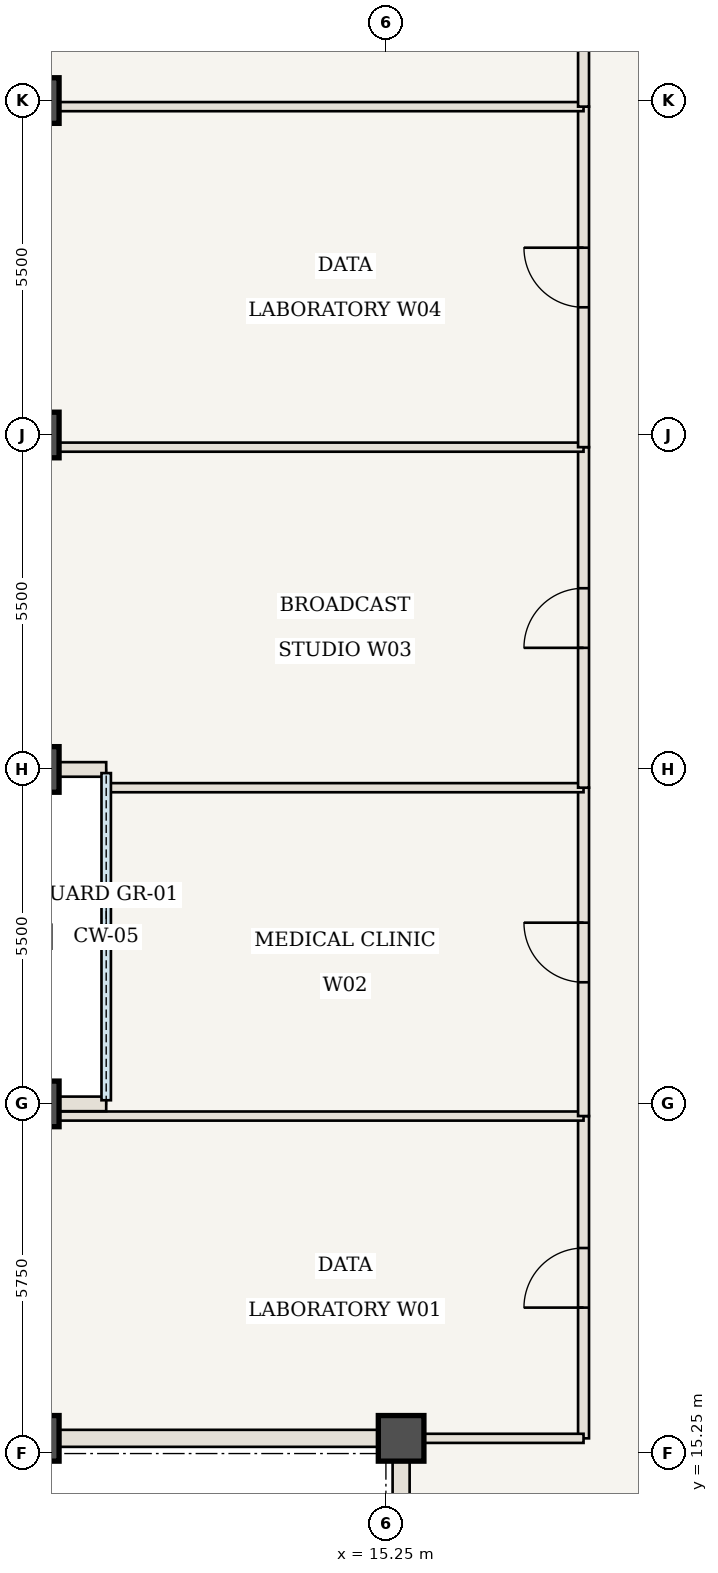
"""IFC4 building model, lengths in metres.
Left out: names, types, materials, properties, quantities, classifications, styles, units other than length and angle.
Written with IfcOpenShell. Run it as: python <this file> out.ifc"""

import sys

from ifc_helpers import new_model, si_unit, direction, frame, frame_2d, origin, origin_2d, place, context, subcontext, project, spatial, rectangle, extrude, element, fill, save


model = new_model("IFC4")
c1 = context("Model", 3, precision=1e-05, world=origin(), true_north=direction((0.0, 1.0)))
c2 = subcontext(c1, "Body", "Model", "MODEL_VIEW")
j1 = project(units=[si_unit("LENGTHUNIT", "METRE"), si_unit("PLANEANGLEUNIT", "RADIAN")], contexts=[c1])
p1 = place(None, origin())
s1 = spatial("IfcSite", under=j1, at=p1, CompositionType="ELEMENT")
p2 = place(p1, origin())
s2 = spatial("IfcBuilding", under=s1, at=p2, CompositionType="ELEMENT")
p3 = place(p2, frame((0.0, 0.0, 304.5)))
s3 = spatial("IfcBuildingStorey", under=s2, at=p3, CompositionType="ELEMENT", Elevation=304.5)
for number, where, z_axis, x_axis in (
    (1, (15.5, 15.5, 0.0), (0.0, 0.0, 1.0), (1.0, 0.0, 0.0)),
    (2, (9.5, 15.5, 0.0), (0.0, 0.0, 1.0), (1.0, 0.0, 0.0)),
    (3, (9.5, 21.0, 0.0), (0.0, 0.0, 1.0), (1.0, 0.0, 0.0)),
    (4, (9.5, 26.5, 0.0), (0.0, 0.0, 1.0), (1.0, 0.0, 0.0)),
    (5, (9.5, 32.0, 0.0), (0.0, 0.0, 1.0), (1.0, 0.0, 0.0)),
    (6, (9.5, 37.5, 0.0), (0.0, 0.0, 1.0), (1.0, 0.0, 0.0)),
):
    element("IfcColumn", number, at=place(p3, frame(where, z_axis=z_axis, x_axis=x_axis)), inside=s3, PredefinedType="COLUMN", context=c2, shape_type="SweptSolid", body=[
        extrude(rectangle(XDim=0.75, YDim=0.75, at=origin_2d()), origin(), (0.0, 0.0, 1.0), 3.85),
    ])
p4 = place(p3, frame((18.5, 15.5, 0.0), z_axis=(0.0, 0.0, 1.0), x_axis=(0.0, 1.0, 0.0)))
e7 = element("IfcWall", 7, at=p4, inside=s3, PredefinedType="STANDARD", context=c2, shape_type="SweptSolid", body=[
    extrude(rectangle(XDim=5.3, YDim=0.18, at=frame_2d((2.65, 0.0))), origin(), (0.0, 0.0, 1.0), 3.63),
])
p5 = place(p4, frame((2.15, 0.0, 0.0)))
e8 = element("IfcOpeningElement", 8, at=p5, cuts=e7, PredefinedType="OPENING", context=c2, shape_type="SweptSolid", body=[
    extrude(rectangle(XDim=0.98, YDim=2.2, at=frame_2d((0.49, 1.1))), frame((0.0, 0.1, 0.0), z_axis=(0.0, -1.0, 0.0), x_axis=(1.0, 0.0, 0.0)), (0.0, 0.0, 1.0), 0.2),
])
p6 = place(p3, frame((9.56, 20.8, 0.0), z_axis=(0.0, 0.0, 1.0), x_axis=(1.0, 0.0, 0.0)))
e9 = element("IfcWall", 9, at=p6, inside=s3, PredefinedType="STANDARD", context=c2, shape_type="SweptSolid", body=[
    extrude(rectangle(XDim=8.94, YDim=0.15, at=frame_2d((4.47, 0.0))), origin(), (0.0, 0.0, 1.0), 3.085),
])
p7 = place(p3, frame((18.5, 20.8, 0.0), z_axis=(0.0, 0.0, 1.0), x_axis=(0.0, 1.0, 0.0)))
e10 = element("IfcWall", 10, at=p7, inside=s3, PredefinedType="STANDARD", context=c2, shape_type="SweptSolid", body=[
    extrude(rectangle(XDim=5.4, YDim=0.18, at=frame_2d((2.7, 0.0))), origin(), (0.0, 0.0, 1.0), 3.63),
])
p8 = place(p7, frame((2.2, 0.0, 0.0)))
e11 = element("IfcOpeningElement", 11, at=p8, cuts=e10, PredefinedType="OPENING", context=c2, shape_type="SweptSolid", body=[
    extrude(rectangle(XDim=0.98, YDim=2.2, at=frame_2d((0.49, 1.1))), frame((0.0, 0.1, 0.0), z_axis=(0.0, -1.0, 0.0), x_axis=(1.0, 0.0, 0.0)), (0.0, 0.0, 1.0), 0.2),
])
p9 = place(p3, frame((10.66, 26.2, 0.0), z_axis=(0.0, 0.0, 1.0), x_axis=(1.0, 0.0, 0.0)))
e12 = element("IfcWall", 12, at=p9, inside=s3, PredefinedType="STANDARD", context=c2, shape_type="SweptSolid", body=[
    extrude(rectangle(XDim=7.84, YDim=0.15, at=frame_2d((3.92, 0.0))), origin(), (0.0, 0.0, 1.0), 3.63),
])
p10 = place(p3, frame((18.5, 26.2, 0.0), z_axis=(0.0, 0.0, 1.0), x_axis=(0.0, 1.0, 0.0)))
e13 = element("IfcWall", 13, at=p10, inside=s3, PredefinedType="STANDARD", context=c2, shape_type="SweptSolid", body=[
    extrude(rectangle(XDim=5.6, YDim=0.18, at=frame_2d((2.8, 0.0))), origin(), (0.0, 0.0, 1.0), 3.63),
])
p11 = place(p10, frame((2.3, 0.0, 0.0)))
e14 = element("IfcOpeningElement", 14, at=p11, cuts=e13, PredefinedType="OPENING", context=c2, shape_type="SweptSolid", body=[
    extrude(rectangle(XDim=0.98, YDim=2.2, at=frame_2d((0.49, 1.1))), frame((0.0, 0.1, 0.0), z_axis=(0.0, -1.0, 0.0), x_axis=(1.0, 0.0, 0.0)), (0.0, 0.0, 1.0), 0.2),
])
p12 = place(p3, frame((9.56, 31.8, 0.0), z_axis=(0.0, 0.0, 1.0), x_axis=(1.0, 0.0, 0.0)))
e15 = element("IfcWall", 15, at=p12, inside=s3, PredefinedType="STANDARD", context=c2, shape_type="SweptSolid", body=[
    extrude(rectangle(XDim=8.94, YDim=0.15, at=frame_2d((4.47, 0.0))), origin(), (0.0, 0.0, 1.0), 3.085),
])
p13 = place(p3, frame((18.5, 31.8, 0.0), z_axis=(0.0, 0.0, 1.0), x_axis=(0.0, 1.0, 0.0)))
e16 = element("IfcWall", 16, at=p13, inside=s3, PredefinedType="STANDARD", context=c2, shape_type="SweptSolid", body=[
    extrude(rectangle(XDim=5.6, YDim=0.18, at=frame_2d((2.8, 0.0))), origin(), (0.0, 0.0, 1.0), 3.63),
])
p14 = place(p13, frame((2.3, 0.0, 0.0)))
e17 = element("IfcOpeningElement", 17, at=p14, cuts=e16, PredefinedType="OPENING", context=c2, shape_type="SweptSolid", body=[
    extrude(rectangle(XDim=0.98, YDim=2.2, at=frame_2d((0.49, 1.1))), frame((0.0, 0.1, 0.0), z_axis=(0.0, -1.0, 0.0), x_axis=(1.0, 0.0, 0.0)), (0.0, 0.0, 1.0), 0.2),
])
p15 = place(p3, frame((9.56, 37.4, 0.0), z_axis=(0.0, 0.0, 1.0), x_axis=(1.0, 0.0, 0.0)))
e18 = element("IfcWall", 18, at=p15, inside=s3, PredefinedType="STANDARD", context=c2, shape_type="SweptSolid", body=[
    extrude(rectangle(XDim=8.94, YDim=0.15, at=frame_2d((4.47, 0.0))), origin(), (0.0, 0.0, 1.0), 3.63),
])
p16 = place(p3, frame((18.5, 37.4, 0.0), z_axis=(0.0, 0.0, 1.0), x_axis=(0.0, 1.0, 0.0)))
e19 = element("IfcWall", 19, at=p16, inside=s3, PredefinedType="STANDARD", context=c2, shape_type="SweptSolid", body=[
    extrude(rectangle(XDim=5.6, YDim=0.18, at=frame_2d((2.8, 0.0))), origin(), (0.0, 0.0, 1.0), 3.63),
])
p17 = place(p16, frame((2.3, 0.0, 0.0)))
e20 = element("IfcOpeningElement", 20, at=p17, cuts=e19, PredefinedType="OPENING", context=c2, shape_type="SweptSolid", body=[
    extrude(rectangle(XDim=0.98, YDim=2.2, at=frame_2d((0.49, 1.1))), frame((0.0, 0.1, 0.0), z_axis=(0.0, -1.0, 0.0), x_axis=(1.0, 0.0, 0.0)), (0.0, 0.0, 1.0), 0.2),
])
p18 = place(p3, frame((15.5, 15.5, 0.0), z_axis=(0.0, 0.0, 1.0), x_axis=(1.0, 0.0, 0.0)))
e21 = element("IfcWall", 21, at=p18, inside=s3, PredefinedType="STANDARD", context=c2, shape_type="SweptSolid", body=[
    extrude(rectangle(XDim=3.0, YDim=0.15, at=frame_2d((1.5, 0.0))), origin(), (0.0, 0.0, 1.0), 3.63),
])
for number, where, z_axis, x_axis in (
    (22, (9.5, 21.0, 0.0), (0.0, 0.0, 1.0), (1.0, 0.0, 0.0)),
    (23, (9.5, 26.5, 0.0), (0.0, 0.0, 1.0), (1.0, 0.0, 0.0)),
):
    element("IfcWall", number, at=place(p3, frame(where, z_axis=z_axis, x_axis=x_axis)), inside=s3, PredefinedType="USERDEFINED", context=c2, shape_type="SweptSolid", body=[
        extrude(rectangle(XDim=1.15, YDim=0.24, at=frame_2d((0.575, 0.0))), origin(), (0.0, 0.0, 1.0), 2.93),
    ])
for number, where, z_axis, x_axis in (
    (24, (15.5, 9.5, 0.0), (0.0, 0.0, 1.0), (0.0, 1.0, 0.0)),
    (25, (15.5, 15.5, 0.0), (0.0, 0.0, 1.0), (-1.0, 0.0, 0.0)),
):
    element("IfcWall", number, at=place(p3, frame(where, z_axis=z_axis, x_axis=x_axis)), inside=s3, PredefinedType="USERDEFINED", context=c2, shape_type="SweptSolid", body=[
        extrude(rectangle(XDim=6.0, YDim=0.28, at=frame_2d((3.0, 0.0))), origin(), (0.0, 0.0, 1.0), 2.93),
    ])
p19 = place(p5, origin())
e26 = element("IfcDoor", 26, at=p19, inside=s3, OperationType="SINGLE_SWING_LEFT", PredefinedType="DOOR", context=c2, shape_type="SweptSolid", body=[
    extrude(rectangle(XDim=0.98, YDim=2.2, at=frame_2d((0.49, 1.1))), frame((0.0, 0.025, 0.0), z_axis=(0.0, -1.0, 0.0), x_axis=(1.0, 0.0, 0.0)), (0.0, 0.0, 1.0), 0.05),
])
fill(e8, e26)
p20 = place(p8, origin())
e27 = element("IfcDoor", 27, at=p20, inside=s3, OperationType="SINGLE_SWING_RIGHT", PredefinedType="DOOR", context=c2, shape_type="SweptSolid", body=[
    extrude(rectangle(XDim=0.98, YDim=2.2, at=frame_2d((0.49, 1.1))), frame((0.0, 0.025, 0.0), z_axis=(0.0, -1.0, 0.0), x_axis=(1.0, 0.0, 0.0)), (0.0, 0.0, 1.0), 0.05),
])
fill(e11, e27)
p21 = place(p11, origin())
e28 = element("IfcDoor", 28, at=p21, inside=s3, OperationType="SINGLE_SWING_LEFT", PredefinedType="DOOR", context=c2, shape_type="SweptSolid", body=[
    extrude(rectangle(XDim=0.98, YDim=2.2, at=frame_2d((0.49, 1.1))), frame((0.0, 0.025, 0.0), z_axis=(0.0, -1.0, 0.0), x_axis=(1.0, 0.0, 0.0)), (0.0, 0.0, 1.0), 0.05),
])
fill(e14, e28)
p22 = place(p14, origin())
e29 = element("IfcDoor", 29, at=p22, inside=s3, OperationType="SINGLE_SWING_RIGHT", PredefinedType="DOOR", context=c2, shape_type="SweptSolid", body=[
    extrude(rectangle(XDim=0.98, YDim=2.2, at=frame_2d((0.49, 1.1))), frame((0.0, 0.025, 0.0), z_axis=(0.0, -1.0, 0.0), x_axis=(1.0, 0.0, 0.0)), (0.0, 0.0, 1.0), 0.05),
])
fill(e17, e29)
save(model, sys.argv[1])
